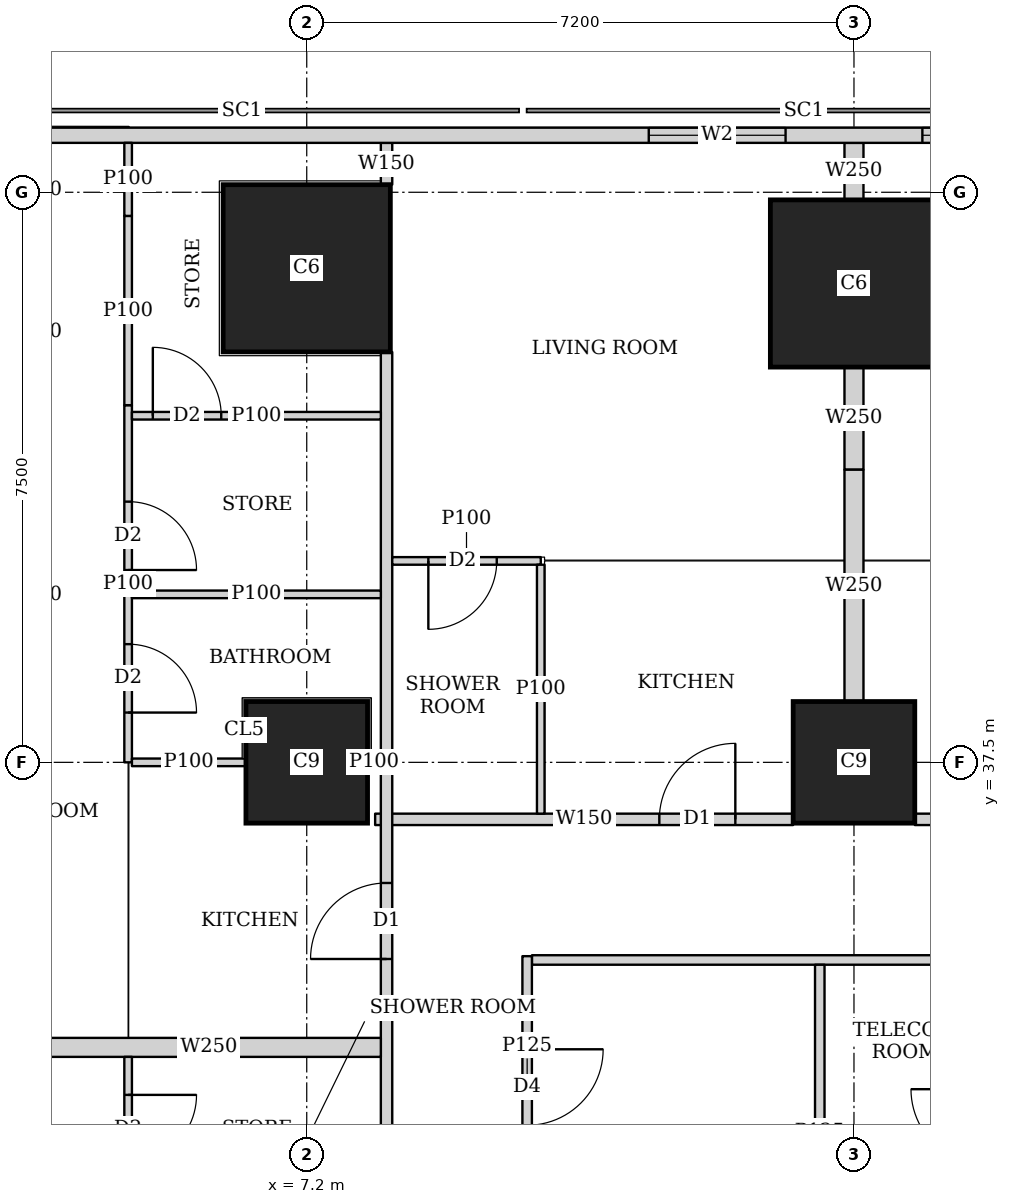
"""IFC4 building model, lengths in metres.
Left out: names, types, materials, properties, quantities, classifications, styles, units other than length and angle.
Written with IfcOpenShell. Run it as: python <this file> out.ifc"""

import sys

from ifc_helpers import new_model, si_unit, direction, frame, frame_2d, origin, origin_2d, place, context, subcontext, project, spatial, rectangle, extrude, element, fill, save


model = new_model("IFC4")
c1 = context("Model", 3, precision=1e-05, world=origin(), true_north=direction((0.0, 1.0)))
c2 = subcontext(c1, "Body", "Model", "MODEL_VIEW")
j1 = project(units=[si_unit("LENGTHUNIT", "METRE"), si_unit("PLANEANGLEUNIT", "RADIAN")], contexts=[c1])
p1 = place(None, origin())
s1 = spatial("IfcSite", under=j1, at=p1, CompositionType="ELEMENT")
p2 = place(p1, origin())
s2 = spatial("IfcBuilding", under=s1, at=p2, CompositionType="ELEMENT")
p3 = place(p2, frame((0.0, 0.0, 81.65)))
s3 = spatial("IfcBuildingStorey", under=s2, at=p3, CompositionType="ELEMENT", Elevation=81.65)
for number, where, z_axis, x_axis in (
    (1, (7.2, 37.5, 0.0), (0.0, 0.0, 1.0), (1.0, 0.0, 0.0)),
    (2, (14.4, 37.5, 0.0), (0.0, 0.0, 1.0), (1.0, 0.0, 0.0)),
):
    element("IfcColumn", number, at=place(p3, frame(where, z_axis=z_axis, x_axis=x_axis)), inside=s3, PredefinedType="COLUMN", context=c2, shape_type="SweptSolid", body=[
        extrude(rectangle(XDim=1.6, YDim=1.6, at=origin_2d()), origin(), (0.0, 0.0, 1.0), 3.75),
    ])
for number, where, z_axis, x_axis in (
    (3, (7.2, 44.0, 0.0), (0.0, 0.0, 1.0), (1.0, 0.0, 0.0)),
    (4, (14.4, 43.8, 0.0), (0.0, 0.0, 1.0), (1.0, 0.0, 0.0)),
):
    element("IfcColumn", number, at=place(p3, frame(where, z_axis=z_axis, x_axis=x_axis)), inside=s3, PredefinedType="COLUMN", context=c2, shape_type="SweptSolid", body=[
        extrude(rectangle(XDim=2.2, YDim=2.2, at=origin_2d()), origin(), (0.0, 0.0, 1.0), 3.75),
    ])
p4 = place(p3, frame((40.106, 45.75, 0.0), z_axis=(0.0, 0.0, 1.0), x_axis=(-1.0, 0.0, 0.0)))
e5 = element("IfcWall", 5, at=p4, inside=s3, PredefinedType="SOLIDWALL", context=c2, shape_type="SweptSolid", body=[
    extrude(rectangle(XDim=37.943, YDim=0.2, at=frame_2d((18.971, 0.0))), origin(), (0.0, 0.0, 1.0), 3.5),
])
p5 = place(p4, frame((8.606, 0.0, 0.9)))
e6 = element("IfcOpeningElement", 6, at=p5, cuts=e5, PredefinedType="OPENING", context=c2, shape_type="SweptSolid", body=[
    extrude(rectangle(XDim=1.8, YDim=1.5, at=frame_2d((0.9, 0.75))), frame((0.0, 0.11, 0.0), z_axis=(0.0, -1.0, 0.0), x_axis=(1.0, 0.0, 0.0)), (0.0, 0.0, 1.0), 0.22),
])
p6 = place(p4, frame((12.206, 0.0, 0.9)))
e7 = element("IfcOpeningElement", 7, at=p6, cuts=e5, PredefinedType="OPENING", context=c2, shape_type="SweptSolid", body=[
    extrude(rectangle(XDim=1.8, YDim=1.5, at=frame_2d((0.9, 0.75))), frame((0.0, 0.11, 0.0), z_axis=(0.0, -1.0, 0.0), x_axis=(1.0, 0.0, 0.0)), (0.0, 0.0, 1.0), 0.22),
])
p7 = place(p4, frame((15.806, 0.0, 0.9)))
e8 = element("IfcOpeningElement", 8, at=p7, cuts=e5, PredefinedType="OPENING", context=c2, shape_type="SweptSolid", body=[
    extrude(rectangle(XDim=1.8, YDim=1.5, at=frame_2d((0.9, 0.75))), frame((0.0, 0.11, 0.0), z_axis=(0.0, -1.0, 0.0), x_axis=(1.0, 0.0, 0.0)), (0.0, 0.0, 1.0), 0.22),
])
p8 = place(p4, frame((19.406, 0.0, 0.9)))
e9 = element("IfcOpeningElement", 9, at=p8, cuts=e5, PredefinedType="OPENING", context=c2, shape_type="SweptSolid", body=[
    extrude(rectangle(XDim=1.8, YDim=1.5, at=frame_2d((0.9, 0.75))), frame((0.0, 0.11, 0.0), z_axis=(0.0, -1.0, 0.0), x_axis=(1.0, 0.0, 0.0)), (0.0, 0.0, 1.0), 0.22),
])
p9 = place(p4, frame((23.006, 0.0, 0.9)))
e10 = element("IfcOpeningElement", 10, at=p9, cuts=e5, PredefinedType="OPENING", context=c2, shape_type="SweptSolid", body=[
    extrude(rectangle(XDim=1.8, YDim=1.5, at=frame_2d((0.9, 0.75))), frame((0.0, 0.11, 0.0), z_axis=(0.0, -1.0, 0.0), x_axis=(1.0, 0.0, 0.0)), (0.0, 0.0, 1.0), 0.22),
])
p10 = place(p4, frame((26.606, 0.0, 0.9)))
e11 = element("IfcOpeningElement", 11, at=p10, cuts=e5, PredefinedType="OPENING", context=c2, shape_type="SweptSolid", body=[
    extrude(rectangle(XDim=1.8, YDim=1.5, at=frame_2d((0.9, 0.75))), frame((0.0, 0.11, 0.0), z_axis=(0.0, -1.0, 0.0), x_axis=(1.0, 0.0, 0.0)), (0.0, 0.0, 1.0), 0.22),
])
p11 = place(p3, frame((8.25, 2.126, 0.0), z_axis=(0.0, 0.0, 1.0), x_axis=(0.0, 1.0, 0.0)))
e12 = element("IfcWall", 12, at=p11, inside=s3, PredefinedType="SOLIDWALL", context=c2, shape_type="SweptSolid", body=[
    extrude(rectangle(XDim=40.773, YDim=0.15, at=frame_2d((20.386, 0.0))), origin(), (0.0, 0.0, 1.0), 3.5),
])
p12 = place(p11, frame((17.787, 0.0, 0.0)))
e13 = element("IfcOpeningElement", 13, at=p12, cuts=e12, PredefinedType="OPENING", context=c2, shape_type="SweptSolid", body=[
    extrude(rectangle(XDim=1.0, YDim=2.1, at=frame_2d((0.5, 1.05))), frame((0.0, 0.085, 0.0), z_axis=(0.0, -1.0, 0.0), x_axis=(1.0, 0.0, 0.0)), (0.0, 0.0, 1.0), 0.17),
])
p13 = place(p11, frame((21.962, 0.0, 0.0)))
e14 = element("IfcOpeningElement", 14, at=p13, cuts=e12, PredefinedType="OPENING", context=c2, shape_type="SweptSolid", body=[
    extrude(rectangle(XDim=1.0, YDim=2.1, at=frame_2d((0.5, 1.05))), frame((0.0, 0.085, 0.0), z_axis=(0.0, -1.0, 0.0), x_axis=(1.0, 0.0, 0.0)), (0.0, 0.0, 1.0), 0.17),
])
p14 = place(p11, frame((32.787, 0.0, 0.0)))
e15 = element("IfcOpeningElement", 15, at=p14, cuts=e12, PredefinedType="OPENING", context=c2, shape_type="SweptSolid", body=[
    extrude(rectangle(XDim=1.0, YDim=2.1, at=frame_2d((0.5, 1.05))), frame((0.0, 0.085, 0.0), z_axis=(0.0, -1.0, 0.0), x_axis=(1.0, 0.0, 0.0)), (0.0, 0.0, 1.0), 0.17),
])
p15 = place(p3, frame((8.25, 45.101, 0.0), z_axis=(0.0, 0.0, 1.0), x_axis=(0.0, 1.0, 0.0)))
e16 = element("IfcWall", 16, at=p15, inside=s3, PredefinedType="SOLIDWALL", context=c2, shape_type="SweptSolid", body=[
    extrude(rectangle(XDim=0.549, YDim=0.15, at=frame_2d((0.274, 0.0))), origin(), (0.0, 0.0, 1.0), 3.5),
])
p16 = place(p3, frame((8.1, 36.75, 0.0), z_axis=(0.0, 0.0, 1.0), x_axis=(1.0, 0.0, 0.0)))
e17 = element("IfcWall", 17, at=p16, inside=s3, PredefinedType="SOLIDWALL", context=c2, shape_type="SweptSolid", body=[
    extrude(rectangle(XDim=5.499, YDim=0.15, at=frame_2d((2.75, 0.0))), origin(), (0.0, 0.0, 1.0), 3.5),
])
p17 = place(p16, frame((3.739, 0.0, 0.0)))
e18 = element("IfcOpeningElement", 18, at=p17, cuts=e17, PredefinedType="OPENING", context=c2, shape_type="SweptSolid", body=[
    extrude(rectangle(XDim=1.0, YDim=2.1, at=frame_2d((0.5, 1.05))), frame((0.0, 0.085, 0.0), z_axis=(0.0, -1.0, 0.0), x_axis=(1.0, 0.0, 0.0)), (0.0, 0.0, 1.0), 0.17),
])
p18 = place(p3, frame((15.201, 36.75, 0.0), z_axis=(0.0, 0.0, 1.0), x_axis=(1.0, 0.0, 0.0)))
e19 = element("IfcWall", 19, at=p18, inside=s3, PredefinedType="SOLIDWALL", context=c2, shape_type="SweptSolid", body=[
    extrude(rectangle(XDim=5.598, YDim=0.15, at=frame_2d((2.799, 0.0))), origin(), (0.0, 0.0, 1.0), 3.5),
])
p19 = place(p18, frame((0.699, 0.0, 0.0)))
e20 = element("IfcOpeningElement", 20, at=p19, cuts=e19, PredefinedType="OPENING", context=c2, shape_type="SweptSolid", body=[
    extrude(rectangle(XDim=1.0, YDim=2.1, at=frame_2d((0.5, 1.05))), frame((0.0, 0.085, 0.0), z_axis=(0.0, -1.0, 0.0), x_axis=(1.0, 0.0, 0.0)), (0.0, 0.0, 1.0), 0.17),
])
p20 = place(p3, frame((4.85, 26.25, 0.0), z_axis=(0.0, 0.0, 1.0), x_axis=(0.0, 1.0, 0.0)))
e21 = element("IfcWall", 21, at=p20, inside=s3, PredefinedType="PARTITIONING", context=c2, shape_type="SweptSolid", body=[
    extrude(rectangle(XDim=7.375, YDim=0.1, at=frame_2d((3.688, 0.0))), origin(), (0.0, 0.0, 1.0), 3.5),
])
p21 = place(p20, frame((0.655, 0.0, 0.0)))
e22 = element("IfcOpeningElement", 22, at=p21, cuts=e21, PredefinedType="OPENING", context=c2, shape_type="SweptSolid", body=[
    extrude(rectangle(XDim=0.9, YDim=2.1, at=frame_2d((0.45, 1.05))), frame((0.0, 0.06, 0.0), z_axis=(0.0, -1.0, 0.0), x_axis=(1.0, 0.0, 0.0)), (0.0, 0.0, 1.0), 0.12),
])
p22 = place(p20, frame((4.1, 0.0, 0.0)))
e23 = element("IfcOpeningElement", 23, at=p22, cuts=e21, PredefinedType="OPENING", context=c2, shape_type="SweptSolid", body=[
    extrude(rectangle(XDim=0.9, YDim=2.1, at=frame_2d((0.45, 1.05))), frame((0.0, 0.06, 0.0), z_axis=(0.0, -1.0, 0.0), x_axis=(1.0, 0.0, 0.0)), (0.0, 0.0, 1.0), 0.12),
])
p23 = place(p20, frame((2.53, 0.0, 0.0)))
e24 = element("IfcOpeningElement", 24, at=p23, cuts=e21, PredefinedType="OPENING", context=c2, shape_type="SweptSolid", body=[
    extrude(rectangle(XDim=0.9, YDim=2.1, at=frame_2d((0.45, 1.05))), frame((0.0, 0.06, 0.0), z_axis=(0.0, -1.0, 0.0), x_axis=(1.0, 0.0, 0.0)), (0.0, 0.0, 1.0), 0.12),
])
p24 = place(p20, frame((5.975, 0.0, 0.0)))
e25 = element("IfcOpeningElement", 25, at=p24, cuts=e21, PredefinedType="OPENING", context=c2, shape_type="SweptSolid", body=[
    extrude(rectangle(XDim=0.9, YDim=2.1, at=frame_2d((0.45, 1.05))), frame((0.0, 0.06, 0.0), z_axis=(0.0, -1.0, 0.0), x_axis=(1.0, 0.0, 0.0)), (0.0, 0.0, 1.0), 0.12),
])
p25 = place(p3, frame((4.85, 37.5, 0.0), z_axis=(0.0, 0.0, 1.0), x_axis=(0.0, 1.0, 0.0)))
e26 = element("IfcWall", 26, at=p25, inside=s3, PredefinedType="PARTITIONING", context=c2, shape_type="SweptSolid", body=[
    extrude(rectangle(XDim=4.699, YDim=0.1, at=frame_2d((2.35, 0.0))), origin(), (0.0, 0.0, 1.0), 3.5),
])
p26 = place(p25, frame((0.655, 0.0, 0.0)))
e27 = element("IfcOpeningElement", 27, at=p26, cuts=e26, PredefinedType="OPENING", context=c2, shape_type="SweptSolid", body=[
    extrude(rectangle(XDim=0.9, YDim=2.1, at=frame_2d((0.45, 1.05))), frame((0.0, 0.06, 0.0), z_axis=(0.0, -1.0, 0.0), x_axis=(1.0, 0.0, 0.0)), (0.0, 0.0, 1.0), 0.12),
])
p27 = place(p25, frame((2.53, 0.0, 0.0)))
e28 = element("IfcOpeningElement", 28, at=p27, cuts=e26, PredefinedType="OPENING", context=c2, shape_type="SweptSolid", body=[
    extrude(rectangle(XDim=0.9, YDim=2.1, at=frame_2d((0.45, 1.05))), frame((0.0, 0.06, 0.0), z_axis=(0.0, -1.0, 0.0), x_axis=(1.0, 0.0, 0.0)), (0.0, 0.0, 1.0), 0.12),
])
p28 = place(p3, frame((4.85, 42.199, 0.0), z_axis=(0.0, 0.0, 1.0), x_axis=(0.0, 1.0, 0.0)))
e29 = element("IfcWall", 29, at=p28, inside=s3, PredefinedType="PARTITIONING", context=c2, shape_type="SweptSolid", body=[
    extrude(rectangle(XDim=2.49, YDim=0.1, at=frame_2d((1.245, 0.0))), origin(), (0.0, 0.0, 1.0), 2.05),
])
p29 = place(p3, frame((4.85, 44.689, 0.0), z_axis=(0.0, 0.0, 1.0), x_axis=(0.0, 1.0, 0.0)))
e30 = element("IfcWall", 30, at=p29, inside=s3, PredefinedType="PARTITIONING", context=c2, shape_type="SweptSolid", body=[
    extrude(rectangle(XDim=0.961, YDim=0.1, at=frame_2d((0.48, 0.0))), origin(), (0.0, 0.0, 1.0), 3.5),
])
p30 = place(p3, frame((4.9, 37.5, 0.0), z_axis=(0.0, 0.0, 1.0), x_axis=(1.0, 0.0, 0.0)))
e31 = element("IfcWall", 31, at=p30, inside=s3, PredefinedType="PARTITIONING", context=c2, shape_type="SweptSolid", body=[
    extrude(rectangle(XDim=1.499, YDim=0.1, at=frame_2d((0.75, 0.0))), origin(), (0.0, 0.0, 1.0), 3.5),
])
p31 = place(p3, frame((8.001, 37.5, 0.0), z_axis=(0.0, 0.0, 1.0), x_axis=(1.0, 0.0, 0.0)))
e32 = element("IfcWall", 32, at=p31, inside=s3, PredefinedType="PARTITIONING", context=c2, shape_type="SweptSolid", body=[
    extrude(rectangle(XDim=0.174, YDim=0.1, at=frame_2d((0.087, 0.0))), origin(), (0.0, 0.0, 1.0), 3.5),
])
p32 = place(p3, frame((4.9, 39.71, 0.0), z_axis=(0.0, 0.0, 1.0), x_axis=(1.0, 0.0, 0.0)))
e33 = element("IfcWall", 33, at=p32, inside=s3, PredefinedType="PARTITIONING", context=c2, shape_type="SweptSolid", body=[
    extrude(rectangle(XDim=3.275, YDim=0.1, at=frame_2d((1.638, 0.0))), origin(), (0.0, 0.0, 1.0), 3.5),
])
p33 = place(p3, frame((3.65, 33.75, 0.0), z_axis=(0.0, 0.0, 1.0), x_axis=(1.0, 0.0, 0.0)))
e34 = element("IfcWall", 34, at=p33, inside=s3, PredefinedType="SOLIDWALL", context=c2, shape_type="SweptSolid", body=[
    extrude(rectangle(XDim=4.525, YDim=0.25, at=frame_2d((2.263, 0.0))), origin(), (0.0, 0.0, 1.0), 3.5),
])
p34 = place(p3, frame((8.325, 40.15, 0.0), z_axis=(0.0, 0.0, 1.0), x_axis=(1.0, 0.0, 0.0)))
e35 = element("IfcWall", 35, at=p34, inside=s3, PredefinedType="PARTITIONING", context=c2, shape_type="SweptSolid", body=[
    extrude(rectangle(XDim=1.954, YDim=0.1, at=frame_2d((0.977, 0.0))), origin(), (0.0, 0.0, 1.0), 3.5),
])
p35 = place(p34, frame((0.475, 0.0, 0.0)))
e36 = element("IfcOpeningElement", 36, at=p35, cuts=e35, PredefinedType="OPENING", context=c2, shape_type="SweptSolid", body=[
    extrude(rectangle(XDim=0.9, YDim=2.1, at=frame_2d((0.45, 1.05))), frame((0.0, 0.06, 0.0), z_axis=(0.0, -1.0, 0.0), x_axis=(1.0, 0.0, 0.0)), (0.0, 0.0, 1.0), 0.12),
])
p36 = place(p3, frame((10.279, 36.825, 0.0), z_axis=(0.0, 0.0, 1.0), x_axis=(0.0, 1.0, 0.0)))
e37 = element("IfcWall", 37, at=p36, inside=s3, PredefinedType="PARTITIONING", context=c2, shape_type="SweptSolid", body=[
    extrude(rectangle(XDim=3.275, YDim=0.1, at=frame_2d((1.638, 0.0))), origin(), (0.0, 0.0, 1.0), 3.5),
])
p37 = place(p3, frame((14.4, 41.35, 0.0), z_axis=(0.0, 0.0, 1.0), x_axis=(0.0, 1.0, 0.0)))
e38 = element("IfcWall", 38, at=p37, inside=s3, PredefinedType="SOLIDWALL", context=c2, shape_type="SweptSolid", body=[
    extrude(rectangle(XDim=1.349, YDim=0.25, at=frame_2d((0.674, 0.0))), origin(), (0.0, 0.0, 1.0), 3.5),
])
p38 = place(p3, frame((14.4, 44.901, 0.0), z_axis=(0.0, 0.0, 1.0), x_axis=(0.0, 1.0, 0.0)))
e39 = element("IfcWall", 39, at=p38, inside=s3, PredefinedType="SOLIDWALL", context=c2, shape_type="SweptSolid", body=[
    extrude(rectangle(XDim=0.749, YDim=0.25, at=frame_2d((0.375, 0.0))), origin(), (0.0, 0.0, 1.0), 3.5),
])
p39 = place(p3, frame((14.4, 38.301, 0.0), z_axis=(0.0, 0.0, 1.0), x_axis=(0.0, 1.0, 0.0)))
e40 = element("IfcWall", 40, at=p39, inside=s3, PredefinedType="SOLIDWALL", context=c2, shape_type="SweptSolid", body=[
    extrude(rectangle(XDim=3.049, YDim=0.25, at=frame_2d((1.524, 0.0))), origin(), (0.0, 0.0, 1.0), 3.5),
])
p40 = place(p3, frame((8.175, 42.06, 0.0), z_axis=(0.0, 0.0, 1.0), x_axis=(-1.0, 0.0, 0.0)))
e41 = element("IfcWall", 41, at=p40, inside=s3, PredefinedType="PARTITIONING", context=c2, shape_type="SweptSolid", body=[
    extrude(rectangle(XDim=3.275, YDim=0.1, at=frame_2d((1.638, 0.0))), origin(), (0.0, 0.0, 1.0), 3.5),
])
p41 = place(p40, frame((2.1, 0.0, 0.0)))
e42 = element("IfcOpeningElement", 42, at=p41, cuts=e41, PredefinedType="OPENING", context=c2, shape_type="SweptSolid", body=[
    extrude(rectangle(XDim=0.9, YDim=2.1, at=frame_2d((0.45, 1.05))), frame((0.0, 0.06, 0.0), z_axis=(0.0, -1.0, 0.0), x_axis=(1.0, 0.0, 0.0)), (0.0, 0.0, 1.0), 0.12),
])
p42 = place(p3, frame((10.1, 31.5, 0.0), z_axis=(0.0, 0.0, 1.0), x_axis=(0.0, 1.0, 0.0)))
e43 = element("IfcWall", 43, at=p42, inside=s3, PredefinedType="PARTITIONING", context=c2, shape_type="SweptSolid", body=[
    extrude(rectangle(XDim=3.45, YDim=0.125, at=frame_2d((1.725, 0.0))), origin(), (0.0, 0.0, 1.0), 3.5),
])
p43 = place(p42, frame((1.225, 0.0, 0.0)))
e44 = element("IfcOpeningElement", 44, at=p43, cuts=e43, PredefinedType="OPENING", context=c2, shape_type="SweptSolid", body=[
    extrude(rectangle(XDim=1.0, YDim=2.1, at=frame_2d((0.5, 1.05))), frame((0.0, 0.073, 0.0), z_axis=(0.0, -1.0, 0.0), x_axis=(1.0, 0.0, 0.0)), (0.0, 0.0, 1.0), 0.145),
])
p44 = place(p3, frame((13.95, 30.45, 0.0), z_axis=(0.0, 0.0, 1.0), x_axis=(0.0, 1.0, 0.0)))
e45 = element("IfcWall", 45, at=p44, inside=s3, PredefinedType="PARTITIONING", context=c2, shape_type="SweptSolid", body=[
    extrude(rectangle(XDim=4.387, YDim=0.125, at=frame_2d((2.193, 0.0))), origin(), (0.0, 0.0, 1.0), 3.5),
])
p45 = place(p3, frame((10.163, 34.9, 0.0), z_axis=(0.0, 0.0, 1.0), x_axis=(1.0, 0.0, 0.0)))
e46 = element("IfcWall", 46, at=p45, inside=s3, PredefinedType="PARTITIONING", context=c2, shape_type="SweptSolid", body=[
    extrude(rectangle(XDim=11.287, YDim=0.125, at=frame_2d((5.644, 0.0))), origin(), (0.0, 0.0, 1.0), 3.5),
])
p46 = place(p45, frame((7.737, 0.0, 0.0)))
e47 = element("IfcOpeningElement", 47, at=p46, cuts=e46, PredefinedType="OPENING", context=c2, shape_type="SweptSolid", body=[
    extrude(rectangle(XDim=1.8, YDim=2.1, at=frame_2d((0.9, 1.05))), frame((0.0, 0.073, 0.0), z_axis=(0.0, -1.0, 0.0), x_axis=(1.0, 0.0, 0.0)), (0.0, 0.0, 1.0), 0.145),
])
p47 = place(p9, origin())
e48 = element("IfcWindow", 48, at=p47, inside=s3, PartitioningType="SINGLE_PANEL", PredefinedType="WINDOW", context=c2, shape_type="SweptSolid", body=[
    extrude(rectangle(XDim=1.8, YDim=1.5, at=frame_2d((0.9, 0.75))), frame((0.0, 0.03, 0.0), z_axis=(0.0, -1.0, 0.0), x_axis=(1.0, 0.0, 0.0)), (0.0, 0.0, 1.0), 0.06),
])
fill(e10, e48)
p48 = place(p10, origin())
e49 = element("IfcWindow", 49, at=p48, inside=s3, PartitioningType="SINGLE_PANEL", PredefinedType="WINDOW", context=c2, shape_type="SweptSolid", body=[
    extrude(rectangle(XDim=1.8, YDim=1.5, at=frame_2d((0.9, 0.75))), frame((0.0, 0.03, 0.0), z_axis=(0.0, -1.0, 0.0), x_axis=(1.0, 0.0, 0.0)), (0.0, 0.0, 1.0), 0.06),
])
fill(e11, e49)
p49 = place(p24, origin())
e50 = element("IfcDoor", 50, at=p49, inside=s3, OperationType="SINGLE_SWING_LEFT", PredefinedType="DOOR", context=c2, shape_type="SweptSolid", body=[
    extrude(rectangle(XDim=0.9, YDim=2.1, at=frame_2d((0.45, 1.05))), frame((0.0, 0.025, 0.0), z_axis=(0.0, -1.0, 0.0), x_axis=(1.0, 0.0, 0.0)), (0.0, 0.0, 1.0), 0.05),
])
fill(e25, e50)
p50 = place(p26, origin())
e51 = element("IfcDoor", 51, at=p50, inside=s3, OperationType="SINGLE_SWING_RIGHT", PredefinedType="DOOR", context=c2, shape_type="SweptSolid", body=[
    extrude(rectangle(XDim=0.9, YDim=2.1, at=frame_2d((0.45, 1.05))), frame((0.0, 0.025, 0.0), z_axis=(0.0, -1.0, 0.0), x_axis=(1.0, 0.0, 0.0)), (0.0, 0.0, 1.0), 0.05),
])
fill(e27, e51)
p51 = place(p27, origin())
e52 = element("IfcDoor", 52, at=p51, inside=s3, OperationType="SINGLE_SWING_RIGHT", PredefinedType="DOOR", context=c2, shape_type="SweptSolid", body=[
    extrude(rectangle(XDim=0.9, YDim=2.1, at=frame_2d((0.45, 1.05))), frame((0.0, 0.025, 0.0), z_axis=(0.0, -1.0, 0.0), x_axis=(1.0, 0.0, 0.0)), (0.0, 0.0, 1.0), 0.05),
])
fill(e28, e52)
p52 = place(p14, origin())
e53 = element("IfcDoor", 53, at=p52, inside=s3, OperationType="SINGLE_SWING_LEFT", PredefinedType="DOOR", context=c2, shape_type="SweptSolid", body=[
    extrude(rectangle(XDim=1.0, YDim=2.1, at=frame_2d((0.5, 1.05))), frame((0.0, 0.025, 0.0), z_axis=(0.0, -1.0, 0.0), x_axis=(1.0, 0.0, 0.0)), (0.0, 0.0, 1.0), 0.05),
])
fill(e15, e53)
p53 = place(p35, origin())
e54 = element("IfcDoor", 54, at=p53, inside=s3, OperationType="SINGLE_SWING_RIGHT", PredefinedType="DOOR", context=c2, shape_type="SweptSolid", body=[
    extrude(rectangle(XDim=0.9, YDim=2.1, at=frame_2d((0.45, 1.05))), frame((0.0, 0.025, 0.0), z_axis=(0.0, -1.0, 0.0), x_axis=(1.0, 0.0, 0.0)), (0.0, 0.0, 1.0), 0.05),
])
fill(e36, e54)
p54 = place(p17, origin())
e55 = element("IfcDoor", 55, at=p54, inside=s3, OperationType="SINGLE_SWING_RIGHT", PredefinedType="DOOR", context=c2, shape_type="SweptSolid", body=[
    extrude(rectangle(XDim=1.0, YDim=2.1, at=frame_2d((0.5, 1.05))), frame((0.0, 0.025, 0.0), z_axis=(0.0, -1.0, 0.0), x_axis=(1.0, 0.0, 0.0)), (0.0, 0.0, 1.0), 0.05),
])
fill(e18, e55)
p55 = place(p41, origin())
e56 = element("IfcDoor", 56, at=p55, inside=s3, OperationType="SINGLE_SWING_LEFT", PredefinedType="DOOR", context=c2, shape_type="SweptSolid", body=[
    extrude(rectangle(XDim=0.9, YDim=2.1, at=frame_2d((0.45, 1.05))), frame((0.0, 0.025, 0.0), z_axis=(0.0, -1.0, 0.0), x_axis=(1.0, 0.0, 0.0)), (0.0, 0.0, 1.0), 0.05),
])
fill(e42, e56)
p56 = place(p43, origin())
e57 = element("IfcDoor", 57, at=p56, inside=s3, OperationType="SINGLE_SWING_LEFT", PredefinedType="DOOR", context=c2, shape_type="SweptSolid", body=[
    extrude(rectangle(XDim=1.0, YDim=2.1, at=frame_2d((0.5, 1.05))), frame((0.0, 0.025, 0.0), z_axis=(0.0, -1.0, 0.0), x_axis=(1.0, 0.0, 0.0)), (0.0, 0.0, 1.0), 0.05),
])
fill(e44, e57)
save(model, sys.argv[1])
